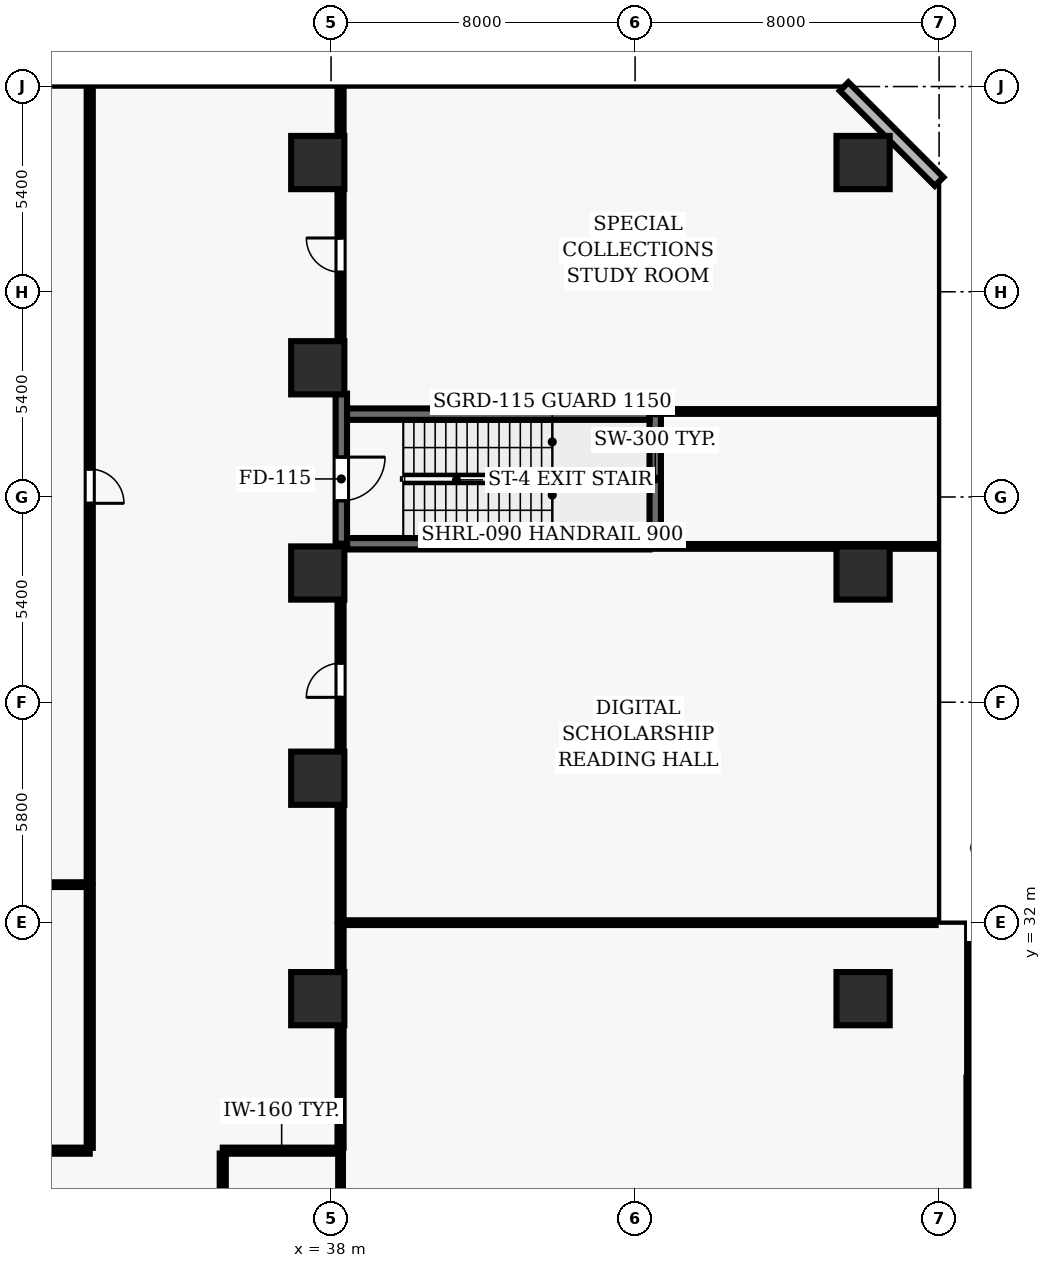
"""IFC4 building model, lengths in metres.
Left out: names, types, materials, properties, quantities, classifications, styles, units other than length and angle.
Written with IfcOpenShell. Run it as: python <this file> out.ifc"""

import sys

from ifc_helpers import new_model, si_unit, direction, frame, frame_2d, origin, origin_2d, place, context, subcontext, project, spatial, rectangle, extrude, element, fill, save


model = new_model("IFC4")
c1 = context("Model", 3, precision=1e-05, world=origin(), true_north=direction((0.0, 1.0)))
c2 = subcontext(c1, "Body", "Model", "MODEL_VIEW")
j1 = project(units=[si_unit("LENGTHUNIT", "METRE"), si_unit("PLANEANGLEUNIT", "RADIAN")], contexts=[c1])
p1 = place(None, origin())
s1 = spatial("IfcSite", under=j1, at=p1, CompositionType="ELEMENT")
p2 = place(p1, origin())
s2 = spatial("IfcBuilding", under=s1, at=p2, CompositionType="ELEMENT")
p3 = place(p2, frame((0.0, 0.0, 15.6)))
s3 = spatial("IfcBuildingStorey", under=s2, at=p3, CompositionType="ELEMENT", Elevation=15.6)
for number, where, z_axis, x_axis in (
    (1, (37.65, 30.0, 0.0), (0.0, 0.0, 1.0), (1.0, 0.0, 0.0)),
    (2, (37.65, 35.8, 0.0), (0.0, 0.0, 1.0), (1.0, 0.0, 0.0)),
    (3, (37.65, 41.2, 0.0), (0.0, 0.0, 1.0), (1.0, 0.0, 0.0)),
    (4, (37.65, 46.6, 0.0), (0.0, 0.0, 1.0), (1.0, 0.0, 0.0)),
    (5, (37.65, 52.0, 0.0), (0.0, 0.0, 1.0), (1.0, 0.0, 0.0)),
    (6, (52.0, 30.0, 0.0), (0.0, 0.0, 1.0), (1.0, 0.0, 0.0)),
    (7, (52.0, 41.2, 0.0), (0.0, 0.0, 1.0), (1.0, 0.0, 0.0)),
    (8, (52.0, 52.0, 0.0), (0.0, 0.0, 1.0), (1.0, 0.0, 0.0)),
):
    element("IfcColumn", number, at=place(p3, frame(where, z_axis=z_axis, x_axis=x_axis)), inside=s3, PredefinedType="COLUMN", context=c2, shape_type="SweptSolid", body=[
        extrude(rectangle(XDim=1.4, YDim=1.4, at=origin_2d()), origin(), (0.0, 0.0, 1.0), 5.2),
    ])
p4 = place(p3, frame((54.0, 51.5, 0.0), z_axis=(0.0, 0.0, 1.0), x_axis=(-0.707106781187, 0.707106781187, 0.0)))
e9 = element("IfcWall", 9, at=p4, inside=s3, PredefinedType="SOLIDWALL", context=c2, shape_type="SweptSolid", body=[
    extrude(rectangle(XDim=3.536, YDim=0.32, at=frame_2d((1.768, 0.0))), origin(), (0.0, 0.0, 1.0), 4.92),
])
p5 = place(p3, frame((38.42, 41.97, 0.0), z_axis=(0.0, 0.0, 1.0), x_axis=(1.0, 0.0, 0.0)))
e10 = element("IfcWall", 10, at=p5, inside=s3, PredefinedType="SHEAR", context=c2, shape_type="SweptSolid", body=[
    extrude(rectangle(XDim=7.96, YDim=0.3, at=frame_2d((3.98, 0.0))), origin(), (0.0, 0.0, 1.0), 4.92),
])
p6 = place(p3, frame((46.53, 41.97, 0.0), z_axis=(0.0, 0.0, 1.0), x_axis=(0.0, 1.0, 0.0)))
e11 = element("IfcWall", 11, at=p6, inside=s3, PredefinedType="SHEAR", context=c2, shape_type="SweptSolid", body=[
    extrude(rectangle(XDim=3.41, YDim=0.3, at=frame_2d((1.705, 0.0))), origin(), (0.0, 0.0, 1.0), 4.92),
])
p7 = place(p3, frame((46.38, 45.38, 0.0), z_axis=(0.0, 0.0, 1.0), x_axis=(-1.0, 0.0, 0.0)))
e12 = element("IfcWall", 12, at=p7, inside=s3, PredefinedType="SHEAR", context=c2, shape_type="SweptSolid", body=[
    extrude(rectangle(XDim=7.96, YDim=0.3, at=frame_2d((3.98, 0.0))), origin(), (0.0, 0.0, 1.0), 4.92),
])
p8 = place(p3, frame((38.27, 45.92, 0.0), z_axis=(0.0, 0.0, 1.0), x_axis=(0.0, -1.0, 0.0)))
e13 = element("IfcWall", 13, at=p8, inside=s3, PredefinedType="SHEAR", context=c2, shape_type="SweptSolid", body=[
    extrude(rectangle(XDim=3.95, YDim=0.3, at=frame_2d((1.975, 0.0))), origin(), (0.0, 0.0, 1.0), 4.92),
])
p9 = place(p8, frame((1.67, 0.0, 0.0)))
e14 = element("IfcOpeningElement", 14, at=p9, cuts=e13, PredefinedType="OPENING", context=c2, shape_type="SweptSolid", body=[
    extrude(rectangle(XDim=1.15, YDim=2.15, at=frame_2d((0.575, 1.075))), frame((0.0, 0.16, 0.0), z_axis=(0.0, -1.0, 0.0), x_axis=(1.0, 0.0, 0.0)), (0.0, 0.0, 1.0), 0.32),
])
p10 = place(p3, frame((31.65, 26.0, 0.0), z_axis=(0.0, 0.0, 1.0), x_axis=(-1.0, 0.0, 0.0)))
e15 = element("IfcWall", 15, at=p10, inside=s3, PredefinedType="PARTITIONING", context=c2, shape_type="SweptSolid", body=[
    extrude(rectangle(XDim=9.495, YDim=0.16, at=frame_2d((4.748, 0.0))), origin(), (0.0, 0.0, 1.0), 4.92),
])
p11 = place(p10, frame((4.297, 0.0, 0.0)))
e16 = element("IfcOpeningElement", 16, at=p11, cuts=e15, PredefinedType="OPENING", context=c2, shape_type="SweptSolid", body=[
    extrude(rectangle(XDim=0.9, YDim=2.1, at=frame_2d((0.45, 1.05))), frame((0.0, 0.09, 0.0), z_axis=(0.0, -1.0, 0.0), x_axis=(1.0, 0.0, 0.0)), (0.0, 0.0, 1.0), 0.18),
])
p12 = place(p3, frame((31.65, 33.0, 0.0), z_axis=(0.0, 0.0, 1.0), x_axis=(-1.0, 0.0, 0.0)))
e17 = element("IfcWall", 17, at=p12, inside=s3, PredefinedType="PARTITIONING", context=c2, shape_type="SweptSolid", body=[
    extrude(rectangle(XDim=9.495, YDim=0.125, at=frame_2d((4.748, 0.0))), origin(), (0.0, 0.0, 1.0), 4.451),
])
p13 = place(p3, frame((35.15, 26.0, 0.0), z_axis=(0.0, 0.0, 1.0), x_axis=(1.0, 0.0, 0.0)))
e18 = element("IfcWall", 18, at=p13, inside=s3, PredefinedType="PARTITIONING", context=c2, shape_type="SweptSolid", body=[
    extrude(rectangle(XDim=3.1, YDim=0.16, at=frame_2d((1.55, 0.0))), origin(), (0.0, 0.0, 1.0), 4.92),
])
p14 = place(p3, frame((38.25, 32.0, 0.0), z_axis=(0.0, 0.0, 1.0), x_axis=(1.0, 0.0, 0.0)))
e19 = element("IfcWall", 19, at=p14, inside=s3, PredefinedType="PARTITIONING", context=c2, shape_type="SweptSolid", body=[
    extrude(rectangle(XDim=15.66, YDim=0.125, at=frame_2d((7.83, 0.0))), origin(), (0.0, 0.0, 1.0), 4.92),
])
for number, where, z_axis, x_axis in (
    (20, (46.38, 45.45, 0.0), (0.0, 0.0, 1.0), (1.0, 0.0, 0.0)),
    (21, (53.91, 41.9, 0.0), (0.0, 0.0, 1.0), (-1.0, 0.0, 0.0)),
):
    element("IfcWall", number, at=place(p3, frame(where, z_axis=z_axis, x_axis=x_axis)), inside=s3, PredefinedType="PARTITIONING", context=c2, shape_type="SweptSolid", body=[
        extrude(rectangle(XDim=7.53, YDim=0.125, at=frame_2d((3.765, 0.0))), origin(), (0.0, 0.0, 1.0), 4.92),
    ])
p15 = place(p3, frame((58.45, 28.0, 0.0), z_axis=(0.0, 0.0, 1.0), x_axis=(-1.0, 0.0, 0.0)))
e22 = element("IfcWall", 22, at=p15, inside=s3, PredefinedType="PARTITIONING", context=c2, shape_type="SweptSolid", body=[
    extrude(rectangle(XDim=3.65, YDim=0.16, at=frame_2d((1.825, 0.0))), origin(), (0.0, 0.0, 1.0), 4.92),
])
p16 = place(p3, frame((31.65, 32.943, 0.0), z_axis=(0.0, 0.0, 1.0), x_axis=(0.0, -1.0, 0.0)))
e23 = element("IfcWall", 23, at=p16, inside=s3, PredefinedType="PARTITIONING", context=c2, shape_type="SweptSolid", body=[
    extrude(rectangle(XDim=6.868, YDim=0.16, at=frame_2d((3.434, 0.0))), origin(), (0.0, 0.0, 1.0), 4.92),
])
p17 = place(p3, frame((31.65, 53.91, 0.0), z_axis=(0.0, 0.0, 1.0), x_axis=(0.0, -1.0, 0.0)))
e24 = element("IfcWall", 24, at=p17, inside=s3, PredefinedType="PARTITIONING", context=c2, shape_type="SweptSolid", body=[
    extrude(rectangle(XDim=20.853, YDim=0.16, at=frame_2d((10.427, 0.0))), origin(), (0.0, 0.0, 1.0), 4.92),
])
p18 = place(p17, frame((9.976, 0.0, 0.0)))
e25 = element("IfcOpeningElement", 25, at=p18, cuts=e24, PredefinedType="OPENING", context=c2, shape_type="SweptSolid", body=[
    extrude(rectangle(XDim=0.9, YDim=2.1, at=frame_2d((0.45, 1.05))), frame((0.0, 0.09, 0.0), z_axis=(0.0, -1.0, 0.0), x_axis=(1.0, 0.0, 0.0)), (0.0, 0.0, 1.0), 0.18),
])
p19 = place(p3, frame((35.15, 24.07, 0.0), z_axis=(0.0, 0.0, 1.0), x_axis=(0.0, 1.0, 0.0)))
e26 = element("IfcWall", 26, at=p19, inside=s3, PredefinedType="PARTITIONING", context=c2, shape_type="SweptSolid", body=[
    extrude(rectangle(XDim=1.855, YDim=0.16, at=frame_2d((0.927, 0.0))), origin(), (0.0, 0.0, 1.0), 4.92),
])
p20 = place(p3, frame((38.25, 25.925, 0.0), z_axis=(0.0, 0.0, 1.0), x_axis=(0.0, -1.0, 0.0)))
e27 = element("IfcWall", 27, at=p20, inside=s3, PredefinedType="PARTITIONING", context=c2, shape_type="SweptSolid", body=[
    extrude(rectangle(XDim=15.2, YDim=0.125, at=frame_2d((7.6, 0.0))), origin(), (0.0, 0.0, 1.0), 4.92),
])
p21 = place(p3, frame((38.25, 26.075, 0.0), z_axis=(0.0, 0.0, 1.0), x_axis=(0.0, 1.0, 0.0)))
e28 = element("IfcWall", 28, at=p21, inside=s3, PredefinedType="PARTITIONING", context=c2, shape_type="SweptSolid", body=[
    extrude(rectangle(XDim=5.867, YDim=0.16, at=frame_2d((2.934, 0.0))), origin(), (0.0, 0.0, 1.0), 4.92),
])
p22 = place(p3, frame((38.25, 32.057, 0.0), z_axis=(0.0, 0.0, 1.0), x_axis=(0.0, 1.0, 0.0)))
e29 = element("IfcWall", 29, at=p22, inside=s3, PredefinedType="PARTITIONING", context=c2, shape_type="SweptSolid", body=[
    extrude(rectangle(XDim=9.843, YDim=0.16, at=frame_2d((4.921, 0.0))), origin(), (0.0, 0.0, 1.0), 4.92),
])
p23 = place(p22, frame((5.871, 0.0, 0.0)))
e30 = element("IfcOpeningElement", 30, at=p23, cuts=e29, PredefinedType="OPENING", context=c2, shape_type="SweptSolid", body=[
    extrude(rectangle(XDim=0.9, YDim=2.1, at=frame_2d((0.45, 1.05))), frame((0.0, 0.09, 0.0), z_axis=(0.0, -1.0, 0.0), x_axis=(1.0, 0.0, 0.0)), (0.0, 0.0, 1.0), 0.18),
])
p24 = place(p3, frame((38.25, 45.92, 0.0), z_axis=(0.0, 0.0, 1.0), x_axis=(0.0, 1.0, 0.0)))
e31 = element("IfcWall", 31, at=p24, inside=s3, PredefinedType="PARTITIONING", context=c2, shape_type="SweptSolid", body=[
    extrude(rectangle(XDim=7.99, YDim=0.16, at=frame_2d((3.995, 0.0))), origin(), (0.0, 0.0, 1.0), 4.92),
])
p25 = place(p24, frame((3.195, 0.0, 0.0)))
e32 = element("IfcOpeningElement", 32, at=p25, cuts=e31, PredefinedType="OPENING", context=c2, shape_type="SweptSolid", body=[
    extrude(rectangle(XDim=0.9, YDim=2.1, at=frame_2d((0.45, 1.05))), frame((0.0, 0.09, 0.0), z_axis=(0.0, -1.0, 0.0), x_axis=(1.0, 0.0, 0.0)), (0.0, 0.0, 1.0), 0.18),
])
p26 = place(p3, frame((54.8, 28.075, 0.0), z_axis=(0.0, 0.0, 1.0), x_axis=(0.0, 1.0, 0.0)))
e33 = element("IfcWall", 33, at=p26, inside=s3, PredefinedType="PARTITIONING", context=c2, shape_type="SweptSolid", body=[
    extrude(rectangle(XDim=3.835, YDim=0.125, at=frame_2d((1.917, 0.0))), origin(), (0.0, 0.0, 1.0), 4.451),
])
p27 = place(p3, frame((54.8, 27.925, 0.0), z_axis=(0.0, 0.0, 1.0), x_axis=(0.0, -1.0, 0.0)))
e34 = element("IfcWall", 34, at=p27, inside=s3, PredefinedType="PARTITIONING", context=c2, shape_type="SweptSolid", body=[
    extrude(rectangle(XDim=17.2, YDim=0.16, at=frame_2d((8.6, 0.0))), origin(), (0.0, 0.0, 1.0), 4.451),
])
p28 = place(p27, frame((8.15, 0.0, 0.0)))
e35 = element("IfcOpeningElement", 35, at=p28, cuts=e34, PredefinedType="OPENING", context=c2, shape_type="SweptSolid", body=[
    extrude(rectangle(XDim=0.9, YDim=2.1, at=frame_2d((0.45, 1.05))), frame((0.0, 0.09, 0.0), z_axis=(0.0, -1.0, 0.0), x_axis=(1.0, 0.0, 0.0)), (0.0, 0.0, 1.0), 0.18),
])
p29 = place(p9, origin())
e36 = element("IfcDoor", 36, at=p29, inside=s3, OperationType="SINGLE_SWING_LEFT", PredefinedType="DOOR", context=c2, shape_type="SweptSolid", body=[
    extrude(rectangle(XDim=1.15, YDim=2.15, at=frame_2d((0.575, 1.075))), frame((0.0, 0.025, 0.0), z_axis=(0.0, -1.0, 0.0), x_axis=(1.0, 0.0, 0.0)), (0.0, 0.0, 1.0), 0.05),
])
fill(e14, e36)
p30 = place(p18, origin())
e37 = element("IfcDoor", 37, at=p30, inside=s3, OperationType="SINGLE_SWING_RIGHT", PredefinedType="DOOR", context=c2, shape_type="SweptSolid", body=[
    extrude(rectangle(XDim=0.9, YDim=2.1, at=frame_2d((0.45, 1.05))), frame((0.0, 0.025, 0.0), z_axis=(0.0, -1.0, 0.0), x_axis=(1.0, 0.0, 0.0)), (0.0, 0.0, 1.0), 0.05),
])
fill(e25, e37)
p31 = place(p23, origin())
e38 = element("IfcDoor", 38, at=p31, inside=s3, OperationType="SINGLE_SWING_LEFT", PredefinedType="DOOR", context=c2, shape_type="SweptSolid", body=[
    extrude(rectangle(XDim=0.9, YDim=2.1, at=frame_2d((0.45, 1.05))), frame((0.0, 0.025, 0.0), z_axis=(0.0, -1.0, 0.0), x_axis=(1.0, 0.0, 0.0)), (0.0, 0.0, 1.0), 0.05),
])
fill(e30, e38)
p32 = place(p25, origin())
e39 = element("IfcDoor", 39, at=p32, inside=s3, OperationType="SINGLE_SWING_RIGHT", PredefinedType="DOOR", context=c2, shape_type="SweptSolid", body=[
    extrude(rectangle(XDim=0.9, YDim=2.1, at=frame_2d((0.45, 1.05))), frame((0.0, 0.025, 0.0), z_axis=(0.0, -1.0, 0.0), x_axis=(1.0, 0.0, 0.0)), (0.0, 0.0, 1.0), 0.05),
])
fill(e32, e39)
save(model, sys.argv[1])
